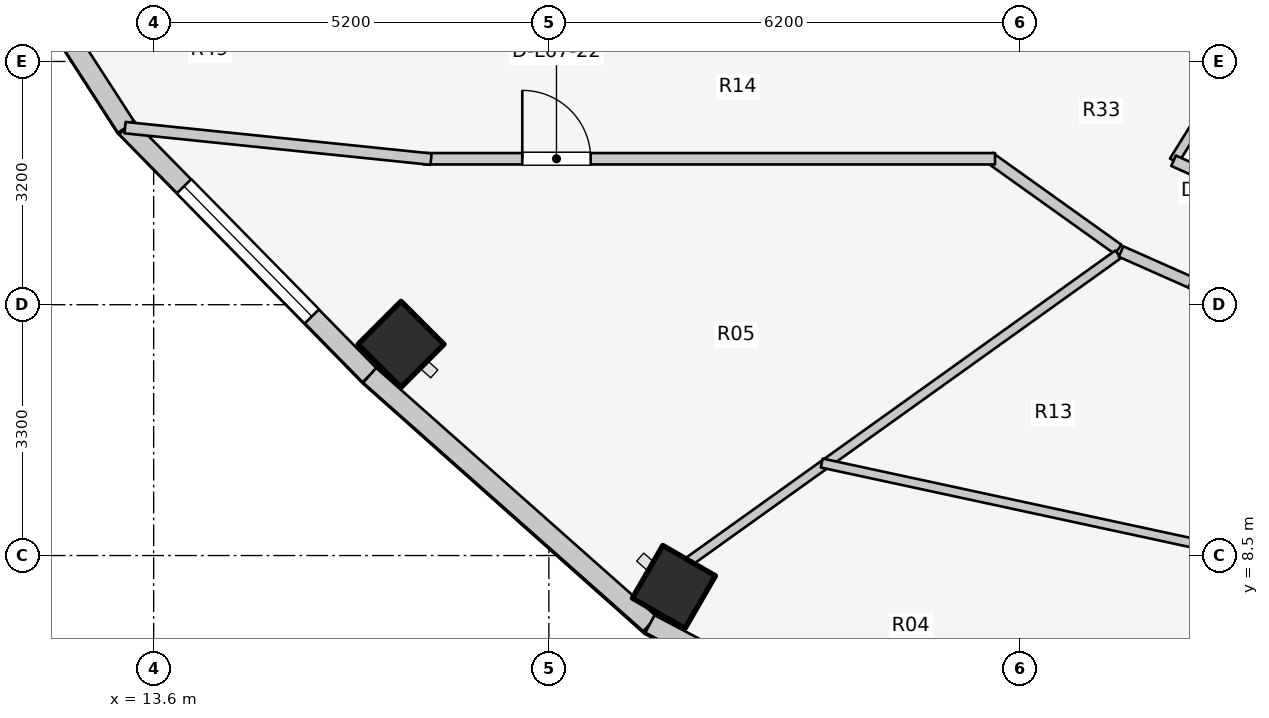
"""IFC4 building model, lengths in metres.
Left out: names, types, materials, properties, quantities, classifications, styles, units other than length and angle.
Written with IfcOpenShell. Run it as: python <this file> out.ifc"""

import sys

from ifc_helpers import new_model, si_unit, direction, frame, frame_2d, origin, origin_2d, place, context, subcontext, project, spatial, rectangle, extrude, element, fill, save


model = new_model("IFC4")
c1 = context("Model", 3, precision=1e-05, world=origin(), true_north=direction((0.0, 1.0)))
c2 = subcontext(c1, "Body", "Model", "MODEL_VIEW")
j1 = project(units=[si_unit("LENGTHUNIT", "METRE"), si_unit("PLANEANGLEUNIT", "RADIAN")], contexts=[c1])
p1 = place(None, origin())
s1 = spatial("IfcSite", under=j1, at=p1, CompositionType="ELEMENT")
p2 = place(p1, origin())
s2 = spatial("IfcBuilding", under=s1, at=p2, CompositionType="ELEMENT")
p3 = place(p2, frame((0.0, 0.0, 220.2)))
s3 = spatial("IfcBuildingStorey", under=s2, at=p3, CompositionType="ELEMENT", Elevation=220.2)
for number, where, z_axis, x_axis in (
    (1, (16.855, 11.279, 0.0), (0.0, 0.0, 1.0), (-0.707, -0.707, 0.0)),
    (2, (20.445, 8.086, 0.0), (0.0, 0.0, 1.0), (-0.5, -0.866, 0.0)),
):
    element("IfcColumn", number, at=place(p3, frame(where, z_axis=z_axis, x_axis=x_axis)), inside=s3, PredefinedType="COLUMN", context=c2, shape_type="SweptSolid", body=[
        extrude(rectangle(XDim=0.8, YDim=0.8, at=origin_2d()), origin(), (0.0, 0.0, 1.0), 3.1),
    ])
p4 = place(p3, frame((10.895, 17.761, 0.0), z_axis=(0.0, 0.0, 1.0), x_axis=(0.542641766008, -0.839964233634, 0.0)))
e3 = element("IfcWall", 3, at=p4, inside=s3, PredefinedType="STANDARD", context=c2, shape_type="SweptSolid", body=[
    extrude(rectangle(XDim=4.319, YDim=0.26, at=frame_2d((2.16, 0.0))), origin(), (0.0, 0.0, 1.0), 2.85),
])
p5 = place(p4, frame((1.41, 0.0, 0.75)))
e4 = element("IfcOpeningElement", 4, at=p5, cuts=e3, PredefinedType="OPENING", context=c2, shape_type="SweptSolid", body=[
    extrude(rectangle(XDim=1.5, YDim=1.6, at=frame_2d((0.75, 0.8))), frame((0.0, 0.14, 0.0), z_axis=(0.0, -1.0, 0.0), x_axis=(1.0, 0.0, 0.0)), (0.0, 0.0, 1.0), 0.28),
])
p6 = place(p3, frame((13.239, 14.133, 0.0), z_axis=(0.0, 0.0, 1.0), x_axis=(0.700642973333, -0.713512034881, 0.0)))
e5 = element("IfcWall", 5, at=p6, inside=s3, PredefinedType="STANDARD", context=c2, shape_type="SweptSolid", body=[
    extrude(rectangle(XDim=4.572, YDim=0.26, at=frame_2d((2.286, 0.0))), origin(), (0.0, 0.0, 1.0), 2.85),
])
p7 = place(p6, frame((1.086, 0.0, 0.75)))
e6 = element("IfcOpeningElement", 6, at=p7, cuts=e5, PredefinedType="OPENING", context=c2, shape_type="SweptSolid", body=[
    extrude(rectangle(XDim=2.4, YDim=1.7, at=frame_2d((1.2, 0.85))), frame((0.0, 0.14, 0.0), z_axis=(0.0, -1.0, 0.0), x_axis=(1.0, 0.0, 0.0)), (0.0, 0.0, 1.0), 0.28),
])
p8 = place(p3, frame((16.442, 10.871, 0.0), z_axis=(0.0, 0.0, 1.0), x_axis=(0.748165854006, -0.663511759428, 0.0)))
e7 = element("IfcWall", 7, at=p8, inside=s3, PredefinedType="STANDARD", context=c2, shape_type="SweptSolid", body=[
    extrude(rectangle(XDim=4.929, YDim=0.26, at=frame_2d((2.464, 0.0))), origin(), (0.0, 0.0, 1.0), 2.85),
])
p9 = place(p3, frame((20.13, 7.601, 0.0), z_axis=(0.0, 0.0, 1.0), x_axis=(0.884000981341, -0.46748504253, 0.0)))
e8 = element("IfcWall", 8, at=p9, inside=s3, PredefinedType="STANDARD", context=c2, shape_type="SweptSolid", body=[
    extrude(rectangle(XDim=5.46, YDim=0.26, at=frame_2d((2.73, 0.0))), origin(), (0.0, 0.0, 1.0), 2.85),
])
p10 = place(p9, frame((1.98, 0.0, 0.75)))
e9 = element("IfcOpeningElement", 9, at=p10, cuts=e8, PredefinedType="OPENING", context=c2, shape_type="SweptSolid", body=[
    extrude(rectangle(XDim=1.5, YDim=1.6, at=frame_2d((0.75, 0.8))), frame((0.0, 0.14, 0.0), z_axis=(0.0, -1.0, 0.0), x_axis=(1.0, 0.0, 0.0)), (0.0, 0.0, 1.0), 0.28),
])
p11 = place(p3, frame((28.45, 15.985, 0.0), z_axis=(0.0, 0.0, 1.0), x_axis=(-0.527527080983, -0.849538215049, 0.0)))
e10 = element("IfcWall", 10, at=p11, inside=s3, PredefinedType="PARTITIONING", context=c2, shape_type="SweptSolid", body=[
    extrude(rectangle(XDim=2.701, YDim=0.125, at=frame_2d((1.351, 0.0))), origin(), (0.0, 0.0, 1.0), 2.376),
])
p12 = place(p3, frame((27.019, 13.694, 0.0), z_axis=(0.0, 0.0, 1.0), x_axis=(0.912628408652, -0.408790151203, 0.0)))
e11 = element("IfcWall", 11, at=p12, inside=s3, PredefinedType="PARTITIONING", context=c2, shape_type="SweptSolid", body=[
    extrude(rectangle(XDim=2.638, YDim=0.15, at=frame_2d((1.319, 0.0))), origin(), (0.0, 0.0, 1.0), 2.376),
])
p13 = place(p3, frame((26.29, 12.527, 0.0), z_axis=(0.0, 0.0, 1.0), x_axis=(-0.813780999276, 0.581171648669, 0.0)))
e12 = element("IfcWall", 12, at=p13, inside=s3, PredefinedType="PARTITIONING", context=c2, shape_type="SweptSolid", body=[
    extrude(rectangle(XDim=2.082, YDim=0.15, at=frame_2d((1.041, 0.0))), origin(), (0.0, 0.0, 1.0), 2.376),
])
p14 = place(p3, frame((17.15, 13.72, 0.0), z_axis=(0.0, 0.0, 1.0), x_axis=(1.0, 0.0, 0.0)))
e13 = element("IfcWall", 13, at=p14, inside=s3, PredefinedType="PARTITIONING", context=c2, shape_type="SweptSolid", body=[
    extrude(rectangle(XDim=7.52, YDim=0.15, at=frame_2d((3.76, 0.0))), origin(), (0.0, 0.0, 1.0), 2.376),
])
p15 = place(p14, frame((1.3, 0.0, 0.0)))
e14 = element("IfcOpeningElement", 14, at=p15, cuts=e13, PredefinedType="OPENING", context=c2, shape_type="SweptSolid", body=[
    extrude(rectangle(XDim=0.9, YDim=2.1, at=frame_2d((0.45, 1.05))), frame((0.0, 0.085, 0.0), z_axis=(0.0, -1.0, 0.0), x_axis=(1.0, 0.0, 0.0)), (0.0, 0.0, 1.0), 0.17),
])
p16 = place(p3, frame((17.25, 13.715, 0.0), z_axis=(0.0, 0.0, 1.0), x_axis=(-0.994734711466, 0.102483431859, 0.0)))
e15 = element("IfcWall", 15, at=p16, inside=s3, PredefinedType="PARTITIONING", context=c2, shape_type="SweptSolid", body=[
    extrude(rectangle(XDim=4.047, YDim=0.15, at=frame_2d((2.024, 0.0))), origin(), (0.0, 0.0, 1.0), 2.22),
])
p17 = place(p3, frame((26.29, 12.463, 0.0), z_axis=(0.0, 0.0, 1.0), x_axis=(-0.813163816543, -0.582034885093, 0.0)))
e16 = element("IfcWall", 16, at=p17, inside=s3, PredefinedType="PARTITIONING", context=c2, shape_type="SweptSolid", body=[
    extrude(rectangle(XDim=6.955, YDim=0.125, at=frame_2d((3.477, 0.0))), origin(), (0.0, 0.0, 1.0), 2.376),
])
p18 = place(p3, frame((22.39, 9.717, 0.0), z_axis=(0.0, 0.0, 1.0), x_axis=(0.977534972695, -0.210773283785, 0.0)))
e17 = element("IfcWall", 17, at=p18, inside=s3, PredefinedType="MOVABLE", context=c2, shape_type="SweptSolid", body=[
    extrude(rectangle(XDim=5.453, YDim=0.12, at=frame_2d((2.727, 0.0))), origin(), (0.0, 0.0, 1.0), 2.376),
])
p19 = place(p3, frame((26.328, 12.499, 0.0), z_axis=(0.0, 0.0, 1.0), x_axis=(0.914139569865, -0.405399613724, 0.0)))
e18 = element("IfcWall", 18, at=p19, inside=s3, PredefinedType="PARTITIONING", context=c2, shape_type="SweptSolid", body=[
    extrude(rectangle(XDim=3.005, YDim=0.15, at=frame_2d((1.502, 0.0))), origin(), (0.0, 0.0, 1.0), 2.376),
])
p20 = place(p19, frame((1.002, 0.0, 0.0)))
e19 = element("IfcOpeningElement", 19, at=p20, cuts=e18, PredefinedType="OPENING", context=c2, shape_type="SweptSolid", body=[
    extrude(rectangle(XDim=1.0, YDim=2.1, at=frame_2d((0.5, 1.05))), frame((0.0, 0.085, 0.0), z_axis=(0.0, -1.0, 0.0), x_axis=(1.0, 0.0, 0.0)), (0.0, 0.0, 1.0), 0.17),
])
p21 = place(p7, origin())
e20 = element("IfcWindow", 20, at=p21, inside=s3, PartitioningType="SINGLE_PANEL", PredefinedType="WINDOW", context=c2, shape_type="SweptSolid", body=[
    extrude(rectangle(XDim=2.4, YDim=1.7, at=frame_2d((1.2, 0.85))), frame((0.0, 0.03, 0.0), z_axis=(0.0, -1.0, 0.0), x_axis=(1.0, 0.0, 0.0)), (0.0, 0.0, 1.0), 0.06),
])
fill(e6, e20)
p22 = place(p15, origin())
e21 = element("IfcDoor", 21, at=p22, inside=s3, OperationType="SINGLE_SWING_LEFT", PredefinedType="DOOR", context=c2, shape_type="SweptSolid", body=[
    extrude(rectangle(XDim=0.9, YDim=2.1, at=frame_2d((0.45, 1.05))), frame((0.0, 0.025, 0.0), z_axis=(0.0, -1.0, 0.0), x_axis=(1.0, 0.0, 0.0)), (0.0, 0.0, 1.0), 0.05),
])
fill(e14, e21)
save(model, sys.argv[1])
